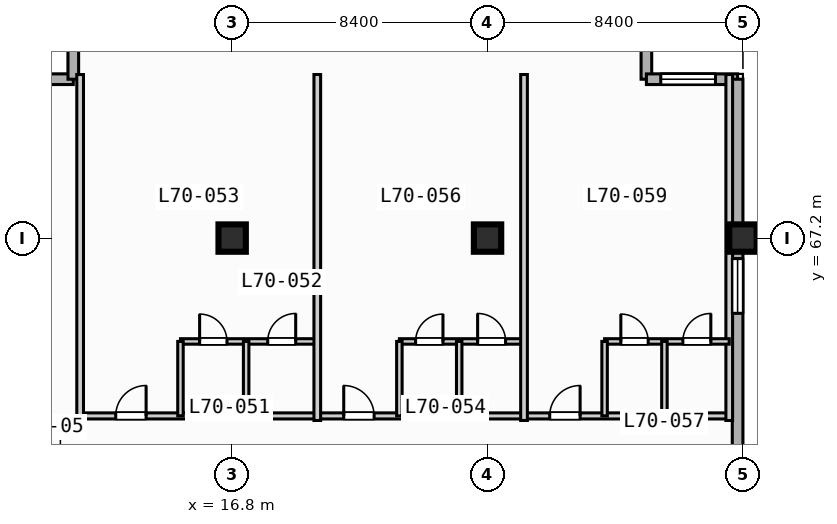
"""IFC4 building model, lengths in metres.
Left out: names, types, materials, properties, quantities, classifications, styles, units other than length and angle.
Written with IfcOpenShell. Run it as: python <this file> out.ifc"""

import sys

from ifc_helpers import new_model, si_unit, direction, frame, frame_2d, origin, origin_2d, place, context, subcontext, project, spatial, rectangle, extrude, element, fill, save


model = new_model("IFC4")
c1 = context("Model", 3, precision=1e-05, world=origin(), true_north=direction((0.0, 1.0)))
c2 = subcontext(c1, "Body", "Model", "MODEL_VIEW")
j1 = project(units=[si_unit("LENGTHUNIT", "METRE"), si_unit("PLANEANGLEUNIT", "RADIAN")], contexts=[c1])
p1 = place(None, origin())
s1 = spatial("IfcSite", under=j1, at=p1, CompositionType="ELEMENT")
p2 = place(p1, origin())
s2 = spatial("IfcBuilding", under=s1, at=p2, CompositionType="ELEMENT")
p3 = place(p2, frame((0.0, 0.0, 282.3)))
s3 = spatial("IfcBuildingStorey", under=s2, at=p3, CompositionType="ELEMENT", Elevation=282.3)
for number, where, z_axis, x_axis in (
    (1, (16.8, 67.2, 0.0), (0.0, 0.0, 1.0), (1.0, 0.0, 0.0)),
    (2, (25.2, 67.2, 0.0), (0.0, 0.0, 1.0), (1.0, 0.0, 0.0)),
    (3, (33.6, 67.2, 0.0), (0.0, 0.0, 1.0), (1.0, 0.0, 0.0)),
):
    element("IfcColumn", number, at=place(p3, frame(where, z_axis=z_axis, x_axis=x_axis)), inside=s3, PredefinedType="COLUMN", context=c2, shape_type="SweptSolid", body=[
        extrude(rectangle(XDim=0.9, YDim=0.9, at=origin_2d()), origin(), (0.0, 0.0, 1.0), 3.7),
    ])
for number, where, z_axis, x_axis in (
    (4, (8.575, 72.425, 0.0), (0.0, 0.0, 1.0), (1.0, 0.0, 0.0)),
    (5, (11.575, 72.425, 0.0), (0.0, 0.0, 1.0), (0.0, 1.0, 0.0)),
    (6, (30.425, 75.425, 0.0), (0.0, 0.0, 1.0), (0.0, -1.0, 0.0)),
):
    element("IfcWall", number, at=place(p3, frame(where, z_axis=z_axis, x_axis=x_axis)), inside=s3, PredefinedType="STANDARD", context=c2, shape_type="SweptSolid", body=[
        extrude(rectangle(XDim=3.0, YDim=0.35, at=frame_2d((1.5, 0.0))), origin(), (0.0, 0.0, 1.0), 3.47),
    ])
p4 = place(p3, frame((30.425, 72.425, 0.0), z_axis=(0.0, 0.0, 1.0), x_axis=(1.0, 0.0, 0.0)))
e7 = element("IfcWall", 7, at=p4, inside=s3, PredefinedType="STANDARD", context=c2, shape_type="SweptSolid", body=[
    extrude(rectangle(XDim=3.0, YDim=0.35, at=frame_2d((1.5, 0.0))), origin(), (0.0, 0.0, 1.0), 3.47),
])
p5 = place(p4, frame((0.472, 0.0, 0.85)))
e8 = element("IfcOpeningElement", 8, at=p5, cuts=e7, PredefinedType="OPENING", context=c2, shape_type="SweptSolid", body=[
    extrude(rectangle(XDim=1.8, YDim=1.8, at=frame_2d((0.9, 0.9))), frame((0.0, 0.185, 0.0), z_axis=(0.0, -1.0, 0.0), x_axis=(1.0, 0.0, 0.0)), (0.0, 0.0, 1.0), 0.37),
])
p6 = place(p3, frame((33.425, 72.425, 0.0), z_axis=(0.0, 0.0, 1.0), x_axis=(0.0, -1.0, 0.0)))
e9 = element("IfcWall", 9, at=p6, inside=s3, PredefinedType="STANDARD", context=c2, shape_type="SweptSolid", body=[
    extrude(rectangle(XDim=39.0, YDim=0.35, at=frame_2d((19.5, 0.0))), origin(), (0.0, 0.0, 1.0), 3.47),
])
p7 = place(p6, frame((5.9, 0.0, 0.85)))
e10 = element("IfcOpeningElement", 10, at=p7, cuts=e9, PredefinedType="OPENING", context=c2, shape_type="SweptSolid", body=[
    extrude(rectangle(XDim=1.8, YDim=1.8, at=frame_2d((0.9, 0.9))), frame((0.0, 0.185, 0.0), z_axis=(0.0, -1.0, 0.0), x_axis=(1.0, 0.0, 0.0)), (0.0, 0.0, 1.0), 0.37),
])
p8 = place(p3, frame((11.8, 61.35, 0.0), z_axis=(0.0, 0.0, 1.0), x_axis=(1.0, 0.0, 0.0)))
e11 = element("IfcWall", 11, at=p8, inside=s3, PredefinedType="PARTITIONING", context=c2, shape_type="SweptSolid", body=[
    extrude(rectangle(XDim=21.35, YDim=0.2, at=frame_2d((10.675, 0.0))), origin(), (0.0, 0.0, 1.0), 3.47),
])
p9 = place(p8, frame((1.17, 0.0, 0.0)))
e12 = element("IfcOpeningElement", 12, at=p9, cuts=e11, PredefinedType="OPENING", context=c2, shape_type="SweptSolid", body=[
    extrude(rectangle(XDim=1.0, YDim=2.15, at=frame_2d((0.5, 1.075))), frame((0.0, 0.11, 0.0), z_axis=(0.0, -1.0, 0.0), x_axis=(1.0, 0.0, 0.0)), (0.0, 0.0, 1.0), 0.22),
])
p10 = place(p8, frame((8.67, 0.0, 0.0)))
e13 = element("IfcOpeningElement", 13, at=p10, cuts=e11, PredefinedType="OPENING", context=c2, shape_type="SweptSolid", body=[
    extrude(rectangle(XDim=1.0, YDim=2.15, at=frame_2d((0.5, 1.075))), frame((0.0, 0.11, 0.0), z_axis=(0.0, -1.0, 0.0), x_axis=(1.0, 0.0, 0.0)), (0.0, 0.0, 1.0), 0.22),
])
p11 = place(p8, frame((15.445, 0.0, 0.0)))
e14 = element("IfcOpeningElement", 14, at=p11, cuts=e11, PredefinedType="OPENING", context=c2, shape_type="SweptSolid", body=[
    extrude(rectangle(XDim=1.0, YDim=2.15, at=frame_2d((0.5, 1.075))), frame((0.0, 0.11, 0.0), z_axis=(0.0, -1.0, 0.0), x_axis=(1.0, 0.0, 0.0)), (0.0, 0.0, 1.0), 0.22),
])
p12 = place(p3, frame((11.8, 61.2, 0.0), z_axis=(0.0, 0.0, 1.0), x_axis=(0.0, 1.0, 0.0)))
e15 = element("IfcWall", 15, at=p12, inside=s3, PredefinedType="PARTITIONING", context=c2, shape_type="SweptSolid", body=[
    extrude(rectangle(XDim=11.38, YDim=0.22, at=frame_2d((5.69, 0.0))), origin(), (0.0, 0.0, 1.0), 3.47),
])
p13 = place(p3, frame((15.1, 63.8, 0.0), z_axis=(0.0, 0.0, 1.0), x_axis=(1.0, 0.0, 0.0)))
e16 = element("IfcWall", 16, at=p13, inside=s3, PredefinedType="PLUMBINGWALL", context=c2, shape_type="SweptSolid", body=[
    extrude(rectangle(XDim=4.5, YDim=0.18, at=frame_2d((2.25, 0.0))), origin(), (0.0, 0.0, 1.0), 3.47),
])
p14 = place(p13, frame((0.63, 0.0, 0.0)))
e17 = element("IfcOpeningElement", 17, at=p14, cuts=e16, PredefinedType="OPENING", context=c2, shape_type="SweptSolid", body=[
    extrude(rectangle(XDim=0.9, YDim=2.1, at=frame_2d((0.45, 1.05))), frame((0.0, 0.1, 0.0), z_axis=(0.0, -1.0, 0.0), x_axis=(1.0, 0.0, 0.0)), (0.0, 0.0, 1.0), 0.2),
])
p15 = place(p13, frame((2.87, 0.0, 0.0)))
e18 = element("IfcOpeningElement", 18, at=p15, cuts=e16, PredefinedType="OPENING", context=c2, shape_type="SweptSolid", body=[
    extrude(rectangle(XDim=0.92, YDim=2.1, at=frame_2d((0.46, 1.05))), frame((0.0, 0.1, 0.0), z_axis=(0.0, -1.0, 0.0), x_axis=(1.0, 0.0, 0.0)), (0.0, 0.0, 1.0), 0.2),
])
for number, where, z_axis, x_axis in (
    (19, (15.1, 61.35, 0.0), (0.0, 0.0, 1.0), (0.0, 1.0, 0.0)),
    (20, (17.26, 61.35, 0.0), (0.0, 0.0, 1.0), (0.0, 1.0, 0.0)),
):
    element("IfcWall", number, at=place(p3, frame(where, z_axis=z_axis, x_axis=x_axis)), inside=s3, PredefinedType="PLUMBINGWALL", context=c2, shape_type="SweptSolid", body=[
        extrude(rectangle(XDim=2.45, YDim=0.18, at=frame_2d((1.225, 0.0))), origin(), (0.0, 0.0, 1.0), 3.47),
    ])
p16 = place(p3, frame((19.6, 61.2, 0.0), z_axis=(0.0, 0.0, 1.0), x_axis=(0.0, 1.0, 0.0)))
e21 = element("IfcWall", 21, at=p16, inside=s3, PredefinedType="PARTITIONING", context=c2, shape_type="SweptSolid", body=[
    extrude(rectangle(XDim=11.38, YDim=0.22, at=frame_2d((5.69, 0.0))), origin(), (0.0, 0.0, 1.0), 3.47),
])
p17 = place(p3, frame((22.3, 63.8, 0.0), z_axis=(0.0, 0.0, 1.0), x_axis=(1.0, 0.0, 0.0)))
e22 = element("IfcWall", 22, at=p17, inside=s3, PredefinedType="PLUMBINGWALL", context=c2, shape_type="SweptSolid", body=[
    extrude(rectangle(XDim=4.1, YDim=0.18, at=frame_2d((2.05, 0.0))), origin(), (0.0, 0.0, 1.0), 3.47),
])
p18 = place(p17, frame((0.534, 0.0, 0.0)))
e23 = element("IfcOpeningElement", 23, at=p18, cuts=e22, PredefinedType="OPENING", context=c2, shape_type="SweptSolid", body=[
    extrude(rectangle(XDim=0.9, YDim=2.1, at=frame_2d((0.45, 1.05))), frame((0.0, 0.1, 0.0), z_axis=(0.0, -1.0, 0.0), x_axis=(1.0, 0.0, 0.0)), (0.0, 0.0, 1.0), 0.2),
])
p19 = place(p17, frame((2.574, 0.0, 0.0)))
e24 = element("IfcOpeningElement", 24, at=p19, cuts=e22, PredefinedType="OPENING", context=c2, shape_type="SweptSolid", body=[
    extrude(rectangle(XDim=0.92, YDim=2.1, at=frame_2d((0.46, 1.05))), frame((0.0, 0.1, 0.0), z_axis=(0.0, -1.0, 0.0), x_axis=(1.0, 0.0, 0.0)), (0.0, 0.0, 1.0), 0.2),
])
for number, where, z_axis, x_axis in (
    (25, (22.3, 61.35, 0.0), (0.0, 0.0, 1.0), (0.0, 1.0, 0.0)),
    (26, (24.268, 61.35, 0.0), (0.0, 0.0, 1.0), (0.0, 1.0, 0.0)),
):
    element("IfcWall", number, at=place(p3, frame(where, z_axis=z_axis, x_axis=x_axis)), inside=s3, PredefinedType="PLUMBINGWALL", context=c2, shape_type="SweptSolid", body=[
        extrude(rectangle(XDim=2.45, YDim=0.18, at=frame_2d((1.225, 0.0))), origin(), (0.0, 0.0, 1.0), 3.47),
    ])
for number, where, z_axis, x_axis in (
    (27, (26.4, 61.2, 0.0), (0.0, 0.0, 1.0), (0.0, 1.0, 0.0)),
    (28, (33.15, 61.2, 0.0), (0.0, 0.0, 1.0), (0.0, 1.0, 0.0)),
):
    element("IfcWall", number, at=place(p3, frame(where, z_axis=z_axis, x_axis=x_axis)), inside=s3, PredefinedType="PARTITIONING", context=c2, shape_type="SweptSolid", body=[
        extrude(rectangle(XDim=11.38, YDim=0.22, at=frame_2d((5.69, 0.0))), origin(), (0.0, 0.0, 1.0), 3.47),
    ])
p20 = place(p3, frame((29.05, 63.8, 0.0), z_axis=(0.0, 0.0, 1.0), x_axis=(1.0, 0.0, 0.0)))
e29 = element("IfcWall", 29, at=p20, inside=s3, PredefinedType="PLUMBINGWALL", context=c2, shape_type="SweptSolid", body=[
    extrude(rectangle(XDim=4.1, YDim=0.18, at=frame_2d((2.05, 0.0))), origin(), (0.0, 0.0, 1.0), 3.47),
])
p21 = place(p20, frame((0.534, 0.0, 0.0)))
e30 = element("IfcOpeningElement", 30, at=p21, cuts=e29, PredefinedType="OPENING", context=c2, shape_type="SweptSolid", body=[
    extrude(rectangle(XDim=0.9, YDim=2.1, at=frame_2d((0.45, 1.05))), frame((0.0, 0.1, 0.0), z_axis=(0.0, -1.0, 0.0), x_axis=(1.0, 0.0, 0.0)), (0.0, 0.0, 1.0), 0.2),
])
p22 = place(p20, frame((2.574, 0.0, 0.0)))
e31 = element("IfcOpeningElement", 31, at=p22, cuts=e29, PredefinedType="OPENING", context=c2, shape_type="SweptSolid", body=[
    extrude(rectangle(XDim=0.92, YDim=2.1, at=frame_2d((0.46, 1.05))), frame((0.0, 0.1, 0.0), z_axis=(0.0, -1.0, 0.0), x_axis=(1.0, 0.0, 0.0)), (0.0, 0.0, 1.0), 0.2),
])
for number, where, z_axis, x_axis in (
    (32, (29.05, 61.35, 0.0), (0.0, 0.0, 1.0), (0.0, 1.0, 0.0)),
    (33, (31.018, 61.35, 0.0), (0.0, 0.0, 1.0), (0.0, 1.0, 0.0)),
):
    element("IfcWall", number, at=place(p3, frame(where, z_axis=z_axis, x_axis=x_axis)), inside=s3, PredefinedType="PLUMBINGWALL", context=c2, shape_type="SweptSolid", body=[
        extrude(rectangle(XDim=2.45, YDim=0.18, at=frame_2d((1.225, 0.0))), origin(), (0.0, 0.0, 1.0), 3.47),
    ])
p23 = place(p5, origin())
e34 = element("IfcWindow", 34, at=p23, inside=s3, PartitioningType="SINGLE_PANEL", PredefinedType="WINDOW", context=c2, shape_type="SweptSolid", body=[
    extrude(rectangle(XDim=1.8, YDim=1.8, at=frame_2d((0.9, 0.9))), frame((0.0, 0.03, 0.0), z_axis=(0.0, -1.0, 0.0), x_axis=(1.0, 0.0, 0.0)), (0.0, 0.0, 1.0), 0.06),
])
fill(e8, e34)
p24 = place(p7, origin())
e35 = element("IfcWindow", 35, at=p24, inside=s3, PartitioningType="SINGLE_PANEL", PredefinedType="WINDOW", context=c2, shape_type="SweptSolid", body=[
    extrude(rectangle(XDim=1.8, YDim=1.8, at=frame_2d((0.9, 0.9))), frame((0.0, 0.03, 0.0), z_axis=(0.0, -1.0, 0.0), x_axis=(1.0, 0.0, 0.0)), (0.0, 0.0, 1.0), 0.06),
])
fill(e10, e35)
p25 = place(p9, origin())
e36 = element("IfcDoor", 36, at=p25, inside=s3, OperationType="SINGLE_SWING_RIGHT", PredefinedType="DOOR", context=c2, shape_type="SweptSolid", body=[
    extrude(rectangle(XDim=1.0, YDim=2.15, at=frame_2d((0.5, 1.075))), frame((0.0, 0.025, 0.0), z_axis=(0.0, -1.0, 0.0), x_axis=(1.0, 0.0, 0.0)), (0.0, 0.0, 1.0), 0.05),
])
fill(e12, e36)
p26 = place(p10, origin())
e37 = element("IfcDoor", 37, at=p26, inside=s3, OperationType="SINGLE_SWING_LEFT", PredefinedType="DOOR", context=c2, shape_type="SweptSolid", body=[
    extrude(rectangle(XDim=1.0, YDim=2.15, at=frame_2d((0.5, 1.075))), frame((0.0, 0.025, 0.0), z_axis=(0.0, -1.0, 0.0), x_axis=(1.0, 0.0, 0.0)), (0.0, 0.0, 1.0), 0.05),
])
fill(e13, e37)
p27 = place(p11, origin())
e38 = element("IfcDoor", 38, at=p27, inside=s3, OperationType="SINGLE_SWING_RIGHT", PredefinedType="DOOR", context=c2, shape_type="SweptSolid", body=[
    extrude(rectangle(XDim=1.0, YDim=2.15, at=frame_2d((0.5, 1.075))), frame((0.0, 0.025, 0.0), z_axis=(0.0, -1.0, 0.0), x_axis=(1.0, 0.0, 0.0)), (0.0, 0.0, 1.0), 0.05),
])
fill(e14, e38)
p28 = place(p14, origin())
e39 = element("IfcDoor", 39, at=p28, inside=s3, OperationType="SINGLE_SWING_LEFT", PredefinedType="DOOR", context=c2, shape_type="SweptSolid", body=[
    extrude(rectangle(XDim=0.9, YDim=2.1, at=frame_2d((0.45, 1.05))), frame((0.0, 0.025, 0.0), z_axis=(0.0, -1.0, 0.0), x_axis=(1.0, 0.0, 0.0)), (0.0, 0.0, 1.0), 0.05),
])
fill(e17, e39)
p29 = place(p15, origin())
e40 = element("IfcDoor", 40, at=p29, inside=s3, OperationType="SINGLE_SWING_RIGHT", PredefinedType="DOOR", context=c2, shape_type="SweptSolid", body=[
    extrude(rectangle(XDim=0.92, YDim=2.1, at=frame_2d((0.46, 1.05))), frame((0.0, 0.025, 0.0), z_axis=(0.0, -1.0, 0.0), x_axis=(1.0, 0.0, 0.0)), (0.0, 0.0, 1.0), 0.05),
])
fill(e18, e40)
p30 = place(p18, origin())
e41 = element("IfcDoor", 41, at=p30, inside=s3, OperationType="SINGLE_SWING_RIGHT", PredefinedType="DOOR", context=c2, shape_type="SweptSolid", body=[
    extrude(rectangle(XDim=0.9, YDim=2.1, at=frame_2d((0.45, 1.05))), frame((0.0, 0.025, 0.0), z_axis=(0.0, -1.0, 0.0), x_axis=(1.0, 0.0, 0.0)), (0.0, 0.0, 1.0), 0.05),
])
fill(e23, e41)
p31 = place(p19, origin())
e42 = element("IfcDoor", 42, at=p31, inside=s3, OperationType="SINGLE_SWING_LEFT", PredefinedType="DOOR", context=c2, shape_type="SweptSolid", body=[
    extrude(rectangle(XDim=0.92, YDim=2.1, at=frame_2d((0.46, 1.05))), frame((0.0, 0.025, 0.0), z_axis=(0.0, -1.0, 0.0), x_axis=(1.0, 0.0, 0.0)), (0.0, 0.0, 1.0), 0.05),
])
fill(e24, e42)
p32 = place(p21, origin())
e43 = element("IfcDoor", 43, at=p32, inside=s3, OperationType="SINGLE_SWING_LEFT", PredefinedType="DOOR", context=c2, shape_type="SweptSolid", body=[
    extrude(rectangle(XDim=0.9, YDim=2.1, at=frame_2d((0.45, 1.05))), frame((0.0, 0.025, 0.0), z_axis=(0.0, -1.0, 0.0), x_axis=(1.0, 0.0, 0.0)), (0.0, 0.0, 1.0), 0.05),
])
fill(e30, e43)
p33 = place(p22, origin())
e44 = element("IfcDoor", 44, at=p33, inside=s3, OperationType="SINGLE_SWING_RIGHT", PredefinedType="DOOR", context=c2, shape_type="SweptSolid", body=[
    extrude(rectangle(XDim=0.92, YDim=2.1, at=frame_2d((0.46, 1.05))), frame((0.0, 0.025, 0.0), z_axis=(0.0, -1.0, 0.0), x_axis=(1.0, 0.0, 0.0)), (0.0, 0.0, 1.0), 0.05),
])
fill(e31, e44)
save(model, sys.argv[1])
